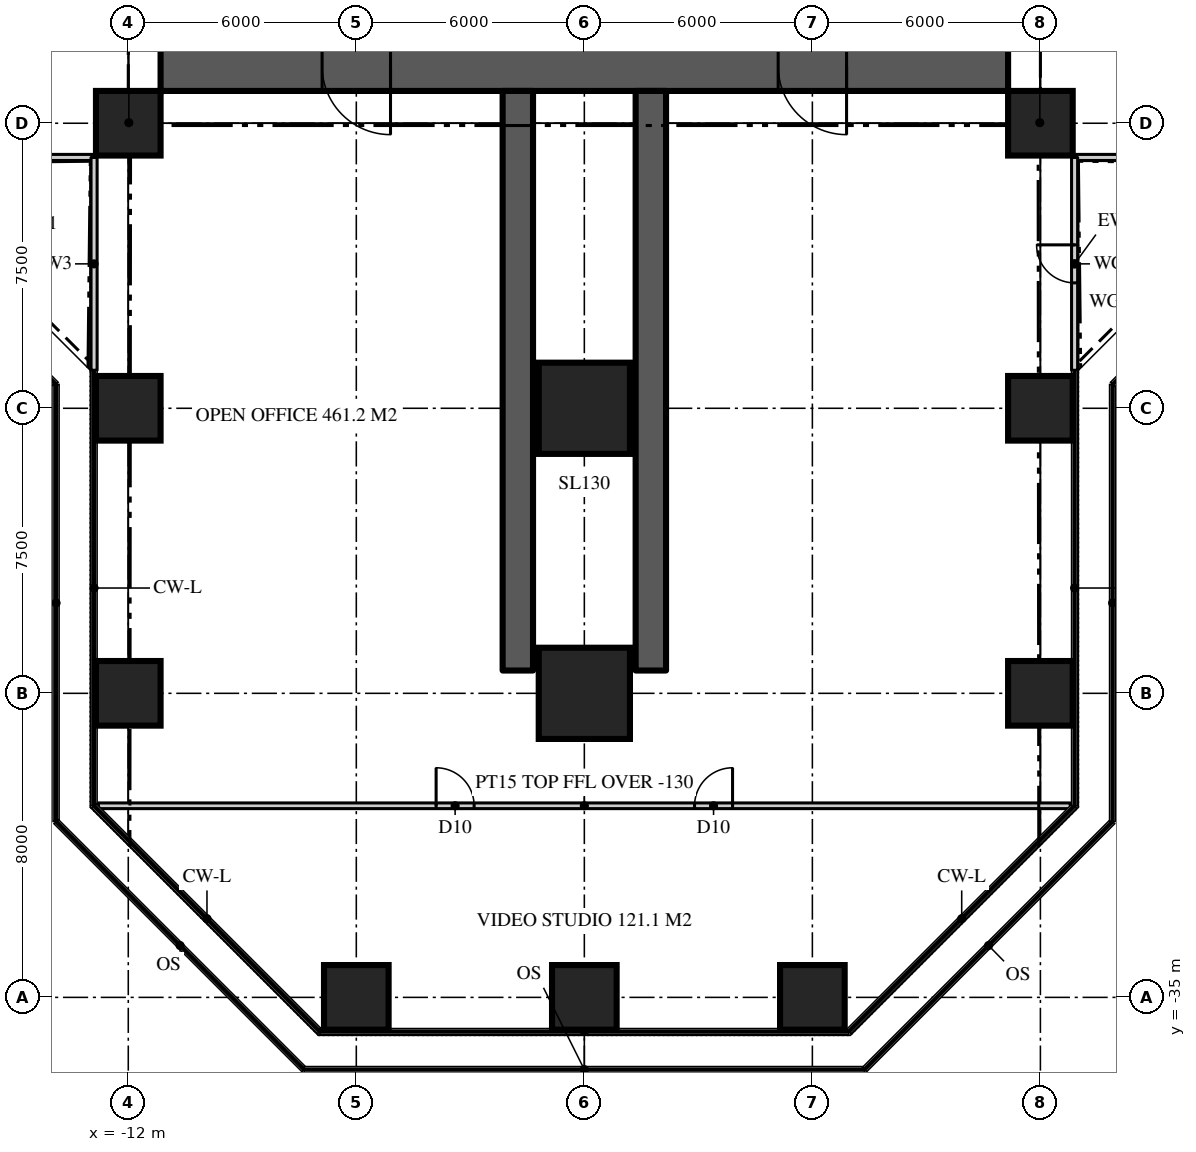
"""IFC4 building model, lengths in metres.
Left out: names, types, materials, properties, quantities, classifications, styles, units other than length and angle.
Written with IfcOpenShell. Run it as: python <this file> out.ifc"""

import sys

from ifc_helpers import new_model, si_unit, direction, frame, frame_2d, origin, origin_2d, place, context, subcontext, project, spatial, rectangle, extrude, element, fill, save


model = new_model("IFC4")
c1 = context("Model", 3, precision=1e-05, world=origin(), true_north=direction((0.0, 1.0)))
c2 = subcontext(c1, "Body", "Model", "MODEL_VIEW")
j1 = project(units=[si_unit("LENGTHUNIT", "METRE"), si_unit("PLANEANGLEUNIT", "RADIAN")], contexts=[c1])
p1 = place(None, origin())
s1 = spatial("IfcSite", under=j1, at=p1, CompositionType="ELEMENT")
p2 = place(p1, origin())
s2 = spatial("IfcBuilding", under=s1, at=p2, CompositionType="ELEMENT")
p3 = place(p2, frame((0.0, 0.0, 70.8)))
s3 = spatial("IfcBuildingStorey", under=s2, at=p3, CompositionType="ELEMENT", Elevation=70.8)
p4 = place(p3, frame((11.15, -10.5, 0.0), z_axis=(0.0, 0.0, 1.0), x_axis=(-1.0, 0.0, 0.0)))
e1 = element("IfcWall", 1, at=p4, inside=s3, PredefinedType="SHEAR", context=c2, shape_type="SweptSolid", body=[
    extrude(rectangle(XDim=22.3, YDim=1.3, at=frame_2d((11.15, 0.0))), origin(), (0.0, 0.0, 1.0), 3.9),
])
p5 = place(p4, frame((16.25, 0.0, 0.0)))
e2 = element("IfcOpeningElement", 2, at=p5, cuts=e1, PredefinedType="OPENING", context=c2, shape_type="SweptSolid", body=[
    extrude(rectangle(XDim=1.8, YDim=2.2, at=frame_2d((0.9, 1.1))), frame((0.0, 0.66, 0.0), z_axis=(0.0, -1.0, 0.0), x_axis=(1.0, 0.0, 0.0)), (0.0, 0.0, 1.0), 1.32),
])
p6 = place(p4, frame((4.25, 0.0, 0.0)))
e3 = element("IfcOpeningElement", 3, at=p6, cuts=e1, PredefinedType="OPENING", context=c2, shape_type="SweptSolid", body=[
    extrude(rectangle(XDim=1.8, YDim=2.2, at=frame_2d((0.9, 1.1))), frame((0.0, 0.66, 0.0), z_axis=(0.0, -1.0, 0.0), x_axis=(1.0, 0.0, 0.0)), (0.0, 0.0, 1.0), 1.32),
])
for number, where, z_axis, x_axis in (
    (4, (-1.75, -11.15, 0.0), (0.0, 0.0, 1.0), (0.0, -1.0, 0.0)),
    (5, (1.75, -11.15, 0.0), (0.0, 0.0, 1.0), (0.0, -1.0, 0.0)),
):
    element("IfcWall", number, at=place(p3, frame(where, z_axis=z_axis, x_axis=x_axis)), inside=s3, PredefinedType="SHEAR", context=c2, shape_type="SweptSolid", body=[
        extrude(rectangle(XDim=15.25, YDim=0.8, at=frame_2d((7.625, 0.0))), origin(), (0.0, 0.0, 1.0), 3.9),
    ])
for number, where, z_axis, x_axis in (
    (6, (-6.0, -35.0, 0.0), (0.0, 0.0, 1.0), (1.0, 0.0, 0.0)),
    (7, (0.0, -35.0, 0.0), (0.0, 0.0, 1.0), (1.0, 0.0, 0.0)),
    (8, (6.0, -35.0, 0.0), (0.0, 0.0, 1.0), (1.0, 0.0, 0.0)),
    (9, (-12.0, -27.0, 0.0), (0.0, 0.0, 1.0), (1.0, 0.0, 0.0)),
):
    element("IfcColumn", number, at=place(p3, frame(where, z_axis=z_axis, x_axis=x_axis)), inside=s3, PredefinedType="COLUMN", context=c2, shape_type="SweptSolid", body=[
        extrude(rectangle(XDim=1.7, YDim=1.7, at=origin_2d()), origin(), (0.0, 0.0, 1.0), 3.9),
    ])
p7 = place(p3, frame((0.0, -27.0, 0.0), z_axis=(0.0, 0.0, 1.0), x_axis=(1.0, 0.0, 0.0)))
e10 = element("IfcColumn", 10, at=p7, inside=s3, PredefinedType="COLUMN", context=c2, shape_type="SweptSolid", body=[
    extrude(rectangle(XDim=2.4, YDim=2.4, at=origin_2d()), origin(), (0.0, 0.0, 1.0), 3.9),
])
for number, where, z_axis, x_axis in (
    (11, (12.0, -27.0, 0.0), (0.0, 0.0, 1.0), (1.0, 0.0, 0.0)),
    (12, (-12.0, -19.5, 0.0), (0.0, 0.0, 1.0), (1.0, 0.0, 0.0)),
):
    element("IfcColumn", number, at=place(p3, frame(where, z_axis=z_axis, x_axis=x_axis)), inside=s3, PredefinedType="COLUMN", context=c2, shape_type="SweptSolid", body=[
        extrude(rectangle(XDim=1.7, YDim=1.7, at=origin_2d()), origin(), (0.0, 0.0, 1.0), 3.9),
    ])
p8 = place(p3, frame((0.0, -19.5, 0.0), z_axis=(0.0, 0.0, 1.0), x_axis=(1.0, 0.0, 0.0)))
e13 = element("IfcColumn", 13, at=p8, inside=s3, PredefinedType="COLUMN", context=c2, shape_type="SweptSolid", body=[
    extrude(rectangle(XDim=2.4, YDim=2.4, at=origin_2d()), origin(), (0.0, 0.0, 1.0), 3.9),
])
for number, where, z_axis, x_axis in (
    (14, (12.0, -19.5, 0.0), (0.0, 0.0, 1.0), (1.0, 0.0, 0.0)),
    (15, (-12.0, -12.0, 0.0), (0.0, 0.0, 1.0), (1.0, 0.0, 0.0)),
    (16, (12.0, -12.0, 0.0), (0.0, 0.0, 1.0), (1.0, 0.0, 0.0)),
):
    element("IfcColumn", number, at=place(p3, frame(where, z_axis=z_axis, x_axis=x_axis)), inside=s3, PredefinedType="COLUMN", context=c2, shape_type="SweptSolid", body=[
        extrude(rectangle(XDim=1.7, YDim=1.7, at=origin_2d()), origin(), (0.0, 0.0, 1.0), 3.9),
    ])
p9 = place(p3, frame((12.9, -12.9, 0.0), z_axis=(0.0, 0.0, 1.0), x_axis=(1.0, 0.0, 0.0)))
e17 = element("IfcWall", 17, at=p9, inside=s3, PredefinedType="SOLIDWALL", context=c2, shape_type="SweptSolid", body=[
    extrude(rectangle(XDim=5.6, YDim=0.16, at=frame_2d((2.8, 0.0))), origin(), (0.0, 0.0, 1.0), 3.77),
])
p10 = place(p3, frame((-18.5, -12.9, 0.0), z_axis=(0.0, 0.0, 1.0), x_axis=(1.0, 0.0, 0.0)))
e18 = element("IfcWall", 18, at=p10, inside=s3, PredefinedType="SOLIDWALL", context=c2, shape_type="SweptSolid", body=[
    extrude(rectangle(XDim=5.6, YDim=0.16, at=frame_2d((2.8, 0.0))), origin(), (0.0, 0.0, 1.0), 3.77),
])
p11 = place(p10, frame((2.3, 0.0, 0.0)))
e19 = element("IfcOpeningElement", 19, at=p11, cuts=e18, PredefinedType="OPENING", context=c2, shape_type="SweptSolid", body=[
    extrude(rectangle(XDim=1.0, YDim=2.2, at=frame_2d((0.5, 1.1))), frame((0.0, 0.09, 0.0), z_axis=(0.0, -1.0, 0.0), x_axis=(1.0, 0.0, 0.0)), (0.0, 0.0, 1.0), 0.18),
])
p12 = place(p3, frame((-12.9, -12.9, 0.0), z_axis=(0.0, 0.0, 1.0), x_axis=(0.0, -1.0, 0.0)))
e20 = element("IfcWall", 20, at=p12, inside=s3, PredefinedType="SOLIDWALL", context=c2, shape_type="SweptSolid", body=[
    extrude(rectangle(XDim=5.6, YDim=0.16, at=frame_2d((2.8, 0.0))), origin(), (0.0, 0.0, 1.0), 3.77),
])
p13 = place(p3, frame((12.9, -18.5, 0.0), z_axis=(0.0, 0.0, 1.0), x_axis=(0.0, 1.0, 0.0)))
e21 = element("IfcWall", 21, at=p13, inside=s3, PredefinedType="SOLIDWALL", context=c2, shape_type="SweptSolid", body=[
    extrude(rectangle(XDim=5.6, YDim=0.16, at=frame_2d((2.8, 0.0))), origin(), (0.0, 0.0, 1.0), 3.77),
])
p14 = place(p13, frame((2.3, 0.0, 0.0)))
e22 = element("IfcOpeningElement", 22, at=p14, cuts=e21, PredefinedType="OPENING", context=c2, shape_type="SweptSolid", body=[
    extrude(rectangle(XDim=1.0, YDim=2.2, at=frame_2d((0.5, 1.1))), frame((0.0, 0.09, 0.0), z_axis=(0.0, -1.0, 0.0), x_axis=(1.0, 0.0, 0.0)), (0.0, 0.0, 1.0), 0.18),
])
p15 = place(p3, frame((-12.786, -29.959, 0.0), z_axis=(0.0, 0.0, 1.0), x_axis=(1.0, 0.0, 0.0)))
e23 = element("IfcWall", 23, at=p15, inside=s3, PredefinedType="PARTITIONING", context=c2, shape_type="SweptSolid", body=[
    extrude(rectangle(XDim=25.573, YDim=0.15, at=frame_2d((12.786, 0.0))), origin(), (0.0, 0.0, 1.0), 3.77),
])
p16 = place(p15, frame((15.687, 0.0, 0.0)))
e24 = element("IfcOpeningElement", 24, at=p16, cuts=e23, PredefinedType="OPENING", context=c2, shape_type="SweptSolid", body=[
    extrude(rectangle(XDim=1.0, YDim=2.2, at=frame_2d((0.5, 1.1))), frame((0.0, 0.085, 0.0), z_axis=(0.0, -1.0, 0.0), x_axis=(1.0, 0.0, 0.0)), (0.0, 0.0, 1.0), 0.17),
])
p17 = place(p15, frame((8.886, 0.0, 0.0)))
e25 = element("IfcOpeningElement", 25, at=p17, cuts=e23, PredefinedType="OPENING", context=c2, shape_type="SweptSolid", body=[
    extrude(rectangle(XDim=1.0, YDim=2.2, at=frame_2d((0.5, 1.1))), frame((0.0, 0.085, 0.0), z_axis=(0.0, -1.0, 0.0), x_axis=(1.0, 0.0, 0.0)), (0.0, 0.0, 1.0), 0.17),
])
for number, where, z_axis, x_axis in (
    (26, (-11.15, -11.15, 0.0), (0.0, 0.0, 1.0), (-0.707, -0.707, 0.0)),
    (27, (11.15, -11.15, 0.0), (0.0, 0.0, 1.0), (0.707, -0.707, 0.0)),
):
    element("IfcWall", number, at=place(p3, frame(where, z_axis=z_axis, x_axis=x_axis)), inside=s3, PredefinedType="PARTITIONING", context=c2, shape_type="SweptSolid", body=[
        extrude(rectangle(XDim=2.362, YDim=0.15, at=frame_2d((1.181, 0.0))), origin(), (0.0, 0.0, 1.0), 3.22),
    ])
p18 = place(p14, origin())
e28 = element("IfcDoor", 28, at=p18, inside=s3, OperationType="SINGLE_SWING_RIGHT", PredefinedType="DOOR", context=c2, shape_type="SweptSolid", body=[
    extrude(rectangle(XDim=1.0, YDim=2.2, at=frame_2d((0.5, 1.1))), frame((0.0, 0.025, 0.0), z_axis=(0.0, -1.0, 0.0), x_axis=(1.0, 0.0, 0.0)), (0.0, 0.0, 1.0), 0.05),
])
fill(e22, e28)
p19 = place(p5, origin())
e29 = element("IfcDoor", 29, at=p19, inside=s3, OperationType="DOUBLE_DOOR_DOUBLE_SWING", PredefinedType="DOOR", context=c2, shape_type="SweptSolid", body=[
    extrude(rectangle(XDim=1.8, YDim=2.2, at=frame_2d((0.9, 1.1))), frame((0.0, 0.025, 0.0), z_axis=(0.0, -1.0, 0.0), x_axis=(1.0, 0.0, 0.0)), (0.0, 0.0, 1.0), 0.05),
])
fill(e2, e29)
p20 = place(p6, origin())
e30 = element("IfcDoor", 30, at=p20, inside=s3, OperationType="DOUBLE_DOOR_DOUBLE_SWING", PredefinedType="DOOR", context=c2, shape_type="SweptSolid", body=[
    extrude(rectangle(XDim=1.8, YDim=2.2, at=frame_2d((0.9, 1.1))), frame((0.0, 0.025, 0.0), z_axis=(0.0, -1.0, 0.0), x_axis=(1.0, 0.0, 0.0)), (0.0, 0.0, 1.0), 0.05),
])
fill(e3, e30)
p21 = place(p16, origin())
e31 = element("IfcDoor", 31, at=p21, inside=s3, OperationType="SINGLE_SWING_RIGHT", PredefinedType="DOOR", context=c2, shape_type="SweptSolid", body=[
    extrude(rectangle(XDim=1.0, YDim=2.2, at=frame_2d((0.5, 1.1))), frame((0.0, 0.025, 0.0), z_axis=(0.0, -1.0, 0.0), x_axis=(1.0, 0.0, 0.0)), (0.0, 0.0, 1.0), 0.05),
])
fill(e24, e31)
p22 = place(p17, origin())
e32 = element("IfcDoor", 32, at=p22, inside=s3, OperationType="SINGLE_SWING_LEFT", PredefinedType="DOOR", context=c2, shape_type="SweptSolid", body=[
    extrude(rectangle(XDim=1.0, YDim=2.2, at=frame_2d((0.5, 1.1))), frame((0.0, 0.025, 0.0), z_axis=(0.0, -1.0, 0.0), x_axis=(1.0, 0.0, 0.0)), (0.0, 0.0, 1.0), 0.05),
])
fill(e25, e32)
save(model, sys.argv[1])
